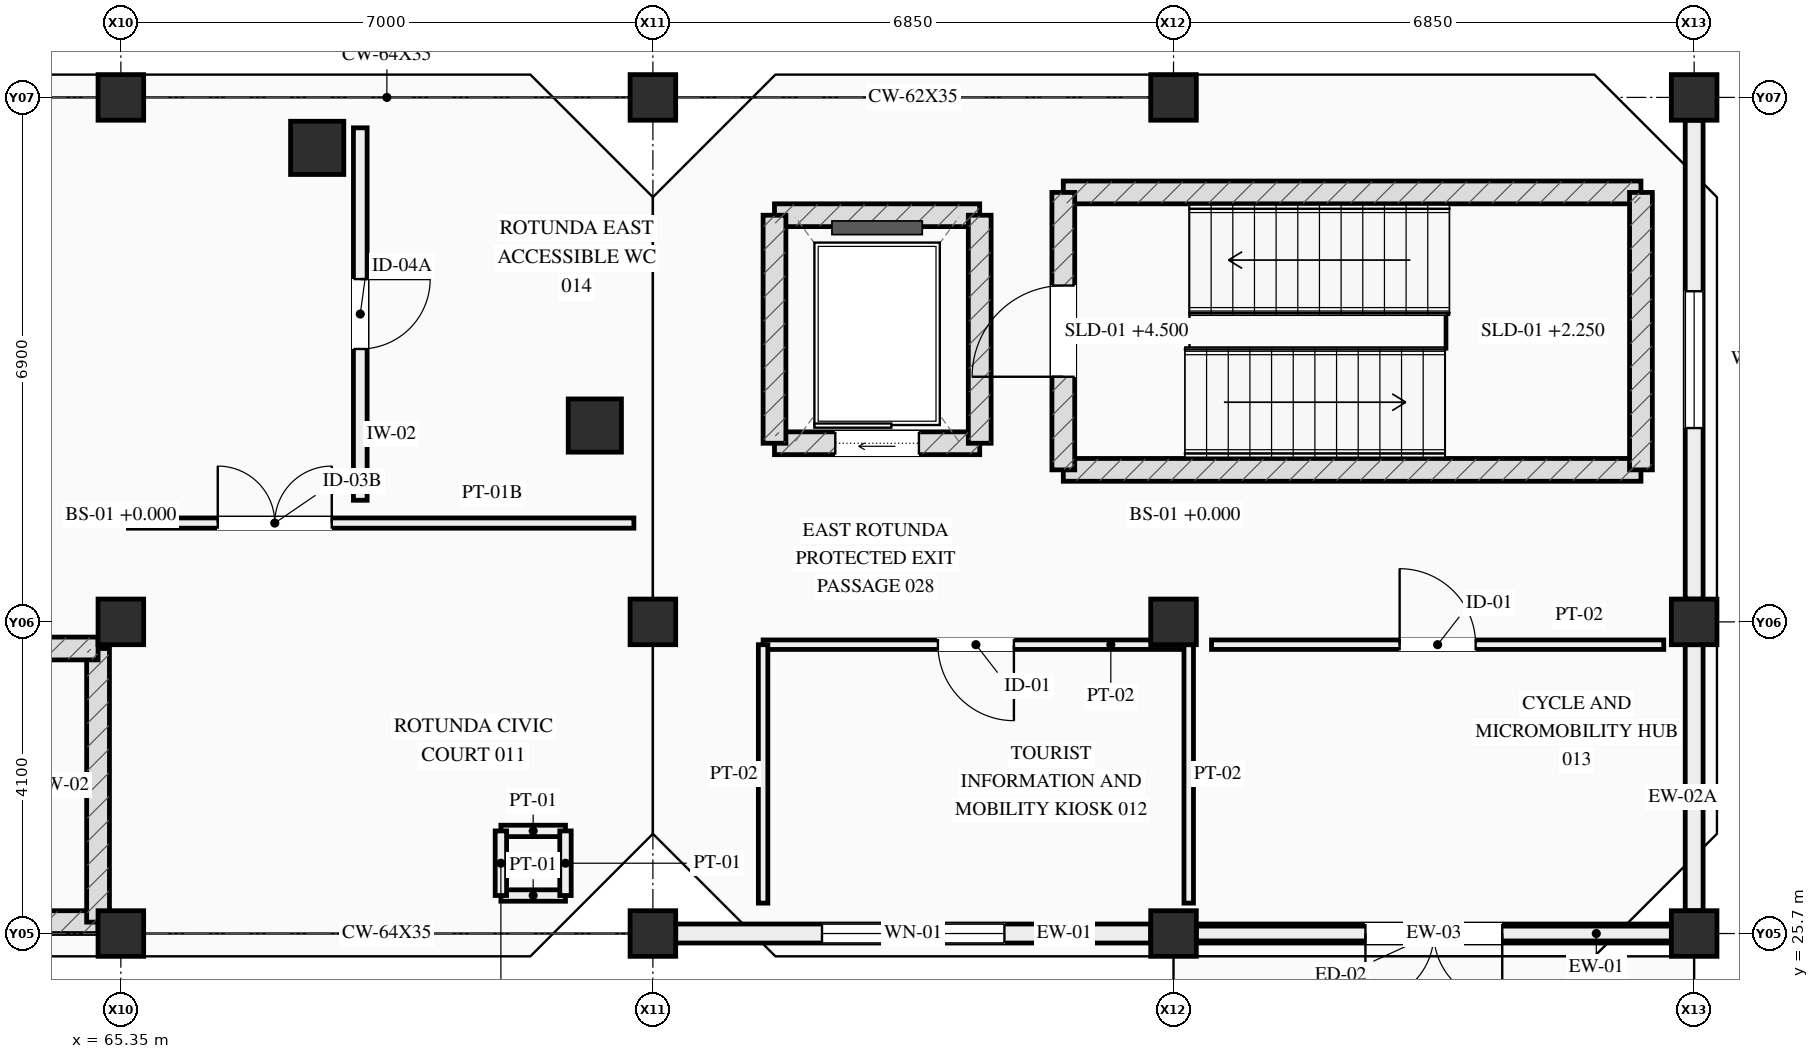
"""IFC4 building model, lengths in metres.
Left out: names, types, materials, properties, quantities, classifications, styles, units other than length and angle.
Written with IfcOpenShell. Run it as: python <this file> out.ifc"""

import sys

from ifc_helpers import new_model, si_unit, direction, frame, frame_2d, origin, origin_2d, place, context, subcontext, project, spatial, rectangle, circle, extrude, element, fill, save


model = new_model("IFC4")
c1 = context("Model", 3, precision=1e-05, world=origin(), true_north=direction((0.0, 1.0)))
c2 = subcontext(c1, "Body", "Model", "MODEL_VIEW")
j1 = project(units=[si_unit("LENGTHUNIT", "METRE"), si_unit("PLANEANGLEUNIT", "RADIAN")], contexts=[c1])
p1 = place(None, origin())
s1 = spatial("IfcSite", under=j1, at=p1, CompositionType="ELEMENT")
p2 = place(p1, origin())
s2 = spatial("IfcBuilding", under=s1, at=p2, CompositionType="ELEMENT")
p3 = place(p2, origin())
s3 = spatial("IfcBuildingStorey", under=s2, at=p3, CompositionType="ELEMENT", Elevation=0.0)
for number, where, z_axis, x_axis in (
    (1, (65.35, 25.7, 0.0), (0.0, 0.0, 1.0), (1.0, 0.0, 0.0)),
    (2, (65.35, 29.8, 0.0), (0.0, 0.0, 1.0), (1.0, 0.0, 0.0)),
    (3, (65.35, 36.7, 0.0), (0.0, 0.0, 1.0), (1.0, 0.0, 0.0)),
    (4, (72.35, 25.7, 0.0), (0.0, 0.0, 1.0), (1.0, 0.0, 0.0)),
    (5, (72.35, 29.8, 0.0), (0.0, 0.0, 1.0), (1.0, 0.0, 0.0)),
    (6, (72.35, 36.7, 0.0), (0.0, 0.0, 1.0), (1.0, 0.0, 0.0)),
    (7, (79.2, 25.7, 0.0), (0.0, 0.0, 1.0), (1.0, 0.0, 0.0)),
    (8, (79.2, 29.8, 0.0), (0.0, 0.0, 1.0), (1.0, 0.0, 0.0)),
    (9, (79.2, 36.7, 0.0), (0.0, 0.0, 1.0), (1.0, 0.0, 0.0)),
    (10, (86.05, 25.7, 0.0), (0.0, 0.0, 1.0), (1.0, 0.0, 0.0)),
    (11, (86.05, 29.8, 0.0), (0.0, 0.0, 1.0), (1.0, 0.0, 0.0)),
    (12, (86.05, 36.7, 0.0), (0.0, 0.0, 1.0), (1.0, 0.0, 0.0)),
):
    element("IfcColumn", number, at=place(p3, frame(where, z_axis=z_axis, x_axis=x_axis)), inside=s3, PredefinedType="COLUMN", context=c2, shape_type="SweptSolid", body=[
        extrude(rectangle(XDim=0.6, YDim=0.6, at=origin_2d()), origin(), (0.0, 0.0, 1.0), 4.5),
    ])
for number, where, z_axis, x_axis in (
    (13, (71.586, 32.383, 0.0), (0.0, 0.0, 1.0), (1.0, 0.0, 0.0)),
    (14, (67.933, 36.036, 0.0), (0.0, 0.0, 1.0), (1.0, 0.0, 0.0)),
):
    element("IfcColumn", number, at=place(p3, frame(where, z_axis=z_axis, x_axis=x_axis)), inside=s3, PredefinedType="COLUMN", context=c2, shape_type="SweptSolid", body=[
        extrude(circle(Radius=0.35, at=origin_2d()), origin(), (0.0, 0.0, 1.0), 4.5),
    ])
p4 = place(p3, frame((85.75, 25.7, 0.0), z_axis=(0.0, 0.0, 1.0), x_axis=(-1.0, 0.0, 0.0)))
e15 = element("IfcWall", 15, at=p4, inside=s3, PredefinedType="STANDARD", context=c2, shape_type="SweptSolid", body=[
    extrude(rectangle(XDim=6.25, YDim=0.25, at=frame_2d((3.125, 0.0))), origin(), (0.0, 0.0, 1.0), 2.985),
])
p5 = place(p4, frame((2.225, 0.0, 0.0)))
e16 = element("IfcOpeningElement", 16, at=p5, cuts=e15, PredefinedType="OPENING", context=c2, shape_type="SweptSolid", body=[
    extrude(rectangle(XDim=1.8, YDim=2.25, at=frame_2d((0.9, 1.125))), frame((0.0, 0.135, 0.0), z_axis=(0.0, -1.0, 0.0), x_axis=(1.0, 0.0, 0.0)), (0.0, 0.0, 1.0), 0.27),
])
p6 = place(p3, frame((85.75, 25.7, 3.35), z_axis=(0.0, 0.0, 1.0), x_axis=(-1.0, 0.0, 0.0)))
e17 = element("IfcWall", 17, at=p6, inside=s3, PredefinedType="STANDARD", context=c2, shape_type="SweptSolid", body=[
    extrude(rectangle(XDim=6.25, YDim=0.195, at=frame_2d((3.125, 0.0))), origin(), (0.0, 0.0, 1.0), 0.23),
])
p7 = place(p3, frame((78.9, 25.7, 0.0), z_axis=(0.0, 0.0, 1.0), x_axis=(-1.0, 0.0, 0.0)))
e18 = element("IfcWall", 18, at=p7, inside=s3, PredefinedType="STANDARD", context=c2, shape_type="SweptSolid", body=[
    extrude(rectangle(XDim=6.25, YDim=0.25, at=frame_2d((3.125, 0.0))), origin(), (0.0, 0.0, 1.0), 3.58),
])
p8 = place(p7, frame((1.925, 0.0, 0.88)))
e19 = element("IfcOpeningElement", 19, at=p8, cuts=e18, PredefinedType="OPENING", context=c2, shape_type="SweptSolid", body=[
    extrude(rectangle(XDim=2.4, YDim=1.45, at=frame_2d((1.2, 0.725))), frame((0.0, 0.135, 0.0), z_axis=(0.0, -1.0, 0.0), x_axis=(1.0, 0.0, 0.0)), (0.0, 0.0, 1.0), 0.27),
])
p9 = place(p3, frame((86.05, 29.5, 0.0), z_axis=(0.0, 0.0, 1.0), x_axis=(0.0, -1.0, 0.0)))
e20 = element("IfcWall", 20, at=p9, inside=s3, PredefinedType="STANDARD", context=c2, shape_type="SweptSolid", body=[
    extrude(rectangle(XDim=3.5, YDim=0.235, at=frame_2d((1.75, 0.0))), origin(), (0.0, 0.0, 1.0), 3.24),
])
p10 = place(p3, frame((86.05, 36.4, 0.0), z_axis=(0.0, 0.0, 1.0), x_axis=(0.0, -1.0, 0.0)))
e21 = element("IfcWall", 21, at=p10, inside=s3, PredefinedType="STANDARD", context=c2, shape_type="SweptSolid", body=[
    extrude(rectangle(XDim=6.3, YDim=0.235, at=frame_2d((3.15, 0.0))), origin(), (0.0, 0.0, 1.0), 3.24),
])
p11 = place(p10, frame((2.25, 0.0, 0.95)))
e22 = element("IfcOpeningElement", 22, at=p11, cuts=e21, PredefinedType="OPENING", context=c2, shape_type="SweptSolid", body=[
    extrude(rectangle(XDim=1.8, YDim=1.4, at=frame_2d((0.9, 0.7))), frame((0.0, 0.127, 0.0), z_axis=(0.0, -1.0, 0.0), x_axis=(1.0, 0.0, 0.0)), (0.0, 0.0, 1.0), 0.255),
])
for number, where, z_axis, x_axis in (
    (23, (70.35, 26.2, 0.0), (0.0, 0.0, 1.0), (1.0, 0.0, 0.0)),
    (24, (70.35, 27.05, 0.0), (0.0, 0.0, 1.0), (1.0, 0.0, 0.0)),
):
    element("IfcWall", number, at=place(p3, frame(where, z_axis=z_axis, x_axis=x_axis)), inside=s3, PredefinedType="PARTITIONING", context=c2, shape_type="SweptSolid", body=[
        extrude(rectangle(XDim=0.85, YDim=0.15, at=frame_2d((0.425, 0.0))), origin(), (0.0, 0.0, 1.0), 3.3),
    ])
for number, where, z_axis, x_axis in (
    (25, (70.35, 26.2, 0.0), (0.0, 0.0, 1.0), (0.0, 1.0, 0.0)),
    (26, (71.2, 26.2, 0.0), (0.0, 0.0, 1.0), (0.0, 1.0, 0.0)),
):
    element("IfcWall", number, at=place(p3, frame(where, z_axis=z_axis, x_axis=x_axis)), inside=s3, PredefinedType="PARTITIONING", context=c2, shape_type="SweptSolid", body=[
        extrude(rectangle(XDim=0.85, YDim=0.15, at=frame_2d((0.425, 0.0))), origin(), (0.0, 0.0, 1.0), 3.3),
    ])
for number, where, z_axis, x_axis in (
    (27, (85.35, 31.8, 0.0), (0.0, 0.0, 1.0), (-1.0, 0.0, 0.0)),
    (28, (77.75, 35.45, 0.0), (0.0, 0.0, 1.0), (1.0, 0.0, 0.0)),
):
    element("IfcWall", number, at=place(p3, frame(where, z_axis=z_axis, x_axis=x_axis)), inside=s3, PredefinedType="SHEAR", context=c2, shape_type="SweptSolid", body=[
        extrude(rectangle(XDim=7.6, YDim=0.3, at=frame_2d((3.8, 0.0))), origin(), (0.0, 0.0, 1.0), 4.26),
    ])
p12 = place(p3, frame((77.75, 31.8, 0.0), z_axis=(0.0, 0.0, 1.0), x_axis=(0.0, 1.0, 0.0)))
e29 = element("IfcWall", 29, at=p12, inside=s3, PredefinedType="SHEAR", context=c2, shape_type="SweptSolid", body=[
    extrude(rectangle(XDim=3.65, YDim=0.3, at=frame_2d((1.825, 0.0))), origin(), (0.0, 0.0, 1.0), 4.26),
])
p13 = place(p12, frame((1.225, 0.0, 0.0)))
e30 = element("IfcOpeningElement", 30, at=p13, cuts=e29, PredefinedType="OPENING", context=c2, shape_type="SweptSolid", body=[
    extrude(rectangle(XDim=1.2, YDim=2.2, at=frame_2d((0.6, 1.1))), frame((0.0, 0.16, 0.0), z_axis=(0.0, -1.0, 0.0), x_axis=(1.0, 0.0, 0.0)), (0.0, 0.0, 1.0), 0.32),
])
p14 = place(p3, frame((85.35, 35.45, 0.0), z_axis=(0.0, 0.0, 1.0), x_axis=(0.0, -1.0, 0.0)))
e31 = element("IfcWall", 31, at=p14, inside=s3, PredefinedType="SHEAR", context=c2, shape_type="SweptSolid", body=[
    extrude(rectangle(XDim=3.65, YDim=0.3, at=frame_2d((1.825, 0.0))), origin(), (0.0, 0.0, 1.0), 4.26),
])
p15 = place(p3, frame((73.95, 32.15, 0.0), z_axis=(0.0, 0.0, 1.0), x_axis=(1.0, 0.0, 0.0)))
e32 = element("IfcWall", 32, at=p15, inside=s3, PredefinedType="SHEAR", context=c2, shape_type="SweptSolid", body=[
    extrude(rectangle(XDim=2.7, YDim=0.3, at=frame_2d((1.35, 0.0))), origin(), (0.0, 0.0, 1.0), 4.26),
])
p16 = place(p15, frame((0.8, 0.0, 0.0)))
e33 = element("IfcOpeningElement", 33, at=p16, cuts=e32, PredefinedType="OPENING", context=c2, shape_type="SweptSolid", body=[
    extrude(rectangle(XDim=1.1, YDim=2.2, at=frame_2d((0.55, 1.1))), frame((0.0, 0.16, 0.0), z_axis=(0.0, -1.0, 0.0), x_axis=(1.0, 0.0, 0.0)), (0.0, 0.0, 1.0), 0.32),
])
p17 = place(p3, frame((73.95, 35.15, 0.0), z_axis=(0.0, 0.0, 1.0), x_axis=(1.0, 0.0, 0.0)))
e34 = element("IfcWall", 34, at=p17, inside=s3, PredefinedType="SHEAR", context=c2, shape_type="SweptSolid", body=[
    extrude(rectangle(XDim=2.7, YDim=0.3, at=frame_2d((1.35, 0.0))), origin(), (0.0, 0.0, 1.0), 4.26),
])
for number, where, z_axis, x_axis in (
    (35, (73.95, 32.15, 0.0), (0.0, 0.0, 1.0), (0.0, 1.0, 0.0)),
    (36, (76.65, 32.15, 0.0), (0.0, 0.0, 1.0), (0.0, 1.0, 0.0)),
):
    element("IfcWall", number, at=place(p3, frame(where, z_axis=z_axis, x_axis=x_axis)), inside=s3, PredefinedType="SHEAR", context=c2, shape_type="SweptSolid", body=[
        extrude(rectangle(XDim=3.0, YDim=0.3, at=frame_2d((1.5, 0.0))), origin(), (0.0, 0.0, 1.0), 4.26),
    ])
p18 = place(p3, frame((58.65, 25.85, 0.0), z_axis=(0.0, 0.0, 1.0), x_axis=(1.0, 0.0, 0.0)))
e37 = element("IfcWall", 37, at=p18, inside=s3, PredefinedType="SHEAR", context=c2, shape_type="SweptSolid", body=[
    extrude(rectangle(XDim=6.4, YDim=0.3, at=frame_2d((3.2, 0.0))), origin(), (0.0, 0.0, 1.0), 4.26),
])
p19 = place(p3, frame((65.05, 25.85, 0.0), z_axis=(0.0, 0.0, 1.0), x_axis=(0.0, 1.0, 0.0)))
e38 = element("IfcWall", 38, at=p19, inside=s3, PredefinedType="SHEAR", context=c2, shape_type="SweptSolid", body=[
    extrude(rectangle(XDim=3.6, YDim=0.3, at=frame_2d((1.8, 0.0))), origin(), (0.0, 0.0, 1.0), 4.26),
])
p20 = place(p3, frame((58.65, 29.45, 0.0), z_axis=(0.0, 0.0, 1.0), x_axis=(1.0, 0.0, 0.0)))
e39 = element("IfcWall", 39, at=p20, inside=s3, PredefinedType="SHEAR", context=c2, shape_type="SweptSolid", body=[
    extrude(rectangle(XDim=6.4, YDim=0.3, at=frame_2d((3.2, 0.0))), origin(), (0.0, 0.0, 1.0), 4.26),
])
p21 = place(p3, frame((65.45, 31.1, 0.0), z_axis=(0.0, 0.0, 1.0), x_axis=(1.0, 0.0, 0.0)))
e40 = element("IfcWall", 40, at=p21, inside=s3, PredefinedType="PARTITIONING", context=c2, shape_type="SweptSolid", body=[
    extrude(rectangle(XDim=6.65, YDim=0.135, at=frame_2d((3.325, 0.0))), origin(), (0.0, 0.0, 1.0), 3.3),
])
p22 = place(p21, frame((1.175, 0.0, 0.0)))
e41 = element("IfcOpeningElement", 41, at=p22, cuts=e40, PredefinedType="OPENING", context=c2, shape_type="SweptSolid", body=[
    extrude(rectangle(XDim=1.5, YDim=2.2, at=frame_2d((0.75, 1.1))), frame((0.0, 0.077, 0.0), z_axis=(0.0, -1.0, 0.0), x_axis=(1.0, 0.0, 0.0)), (0.0, 0.0, 1.0), 0.155),
])
p23 = place(p3, frame((73.8, 29.5, 0.0), z_axis=(0.0, 0.0, 1.0), x_axis=(1.0, 0.0, 0.0)))
e42 = element("IfcWall", 42, at=p23, inside=s3, PredefinedType="PARTITIONING", context=c2, shape_type="SweptSolid", body=[
    extrude(rectangle(XDim=5.6, YDim=0.125, at=frame_2d((2.8, 0.0))), origin(), (0.0, 0.0, 1.0), 3.3),
])
p24 = place(p23, frame((2.3, 0.0, 0.0)))
e43 = element("IfcOpeningElement", 43, at=p24, cuts=e42, PredefinedType="OPENING", context=c2, shape_type="SweptSolid", body=[
    extrude(rectangle(XDim=1.0, YDim=2.15, at=frame_2d((0.5, 1.075))), frame((0.0, 0.073, 0.0), z_axis=(0.0, -1.0, 0.0), x_axis=(1.0, 0.0, 0.0)), (0.0, 0.0, 1.0), 0.145),
])
for number, where, z_axis, x_axis in (
    (44, (73.8, 26.1, 0.0), (0.0, 0.0, 1.0), (0.0, 1.0, 0.0)),
    (45, (79.4, 26.1, 0.0), (0.0, 0.0, 1.0), (0.0, 1.0, 0.0)),
):
    element("IfcWall", number, at=place(p3, frame(where, z_axis=z_axis, x_axis=x_axis)), inside=s3, PredefinedType="PARTITIONING", context=c2, shape_type="SweptSolid", body=[
        extrude(rectangle(XDim=3.4, YDim=0.125, at=frame_2d((1.7, 0.0))), origin(), (0.0, 0.0, 1.0), 3.3),
    ])
p25 = place(p3, frame((79.7, 29.5, 0.0), z_axis=(0.0, 0.0, 1.0), x_axis=(1.0, 0.0, 0.0)))
e46 = element("IfcWall", 46, at=p25, inside=s3, PredefinedType="PARTITIONING", context=c2, shape_type="SweptSolid", body=[
    extrude(rectangle(XDim=5.95, YDim=0.125, at=frame_2d((2.975, 0.0))), origin(), (0.0, 0.0, 1.0), 3.3),
])
p26 = place(p25, frame((2.475, 0.0, 0.0)))
e47 = element("IfcOpeningElement", 47, at=p26, cuts=e46, PredefinedType="OPENING", context=c2, shape_type="SweptSolid", body=[
    extrude(rectangle(XDim=1.0, YDim=2.15, at=frame_2d((0.5, 1.075))), frame((0.0, 0.073, 0.0), z_axis=(0.0, -1.0, 0.0), x_axis=(1.0, 0.0, 0.0)), (0.0, 0.0, 1.0), 0.145),
])
p27 = place(p3, frame((68.5, 31.4, 0.0), z_axis=(0.0, 0.0, 1.0), x_axis=(0.0, 1.0, 0.0)))
e48 = element("IfcWall", 48, at=p27, inside=s3, PredefinedType="PLUMBINGWALL", context=c2, shape_type="SweptSolid", body=[
    extrude(rectangle(XDim=4.9, YDim=0.18, at=frame_2d((2.45, 0.0))), origin(), (0.0, 0.0, 1.0), 3.3),
])
p28 = place(p27, frame((1.99, 0.0, 0.0)))
e49 = element("IfcOpeningElement", 49, at=p28, cuts=e48, PredefinedType="OPENING", context=c2, shape_type="SweptSolid", body=[
    extrude(rectangle(XDim=0.92, YDim=2.1, at=frame_2d((0.46, 1.05))), frame((0.0, 0.1, 0.0), z_axis=(0.0, -1.0, 0.0), x_axis=(1.0, 0.0, 0.0)), (0.0, 0.0, 1.0), 0.2),
])
p29 = place(p5, origin())
e50 = element("IfcDoor", 50, at=p29, inside=s3, OperationType="DOUBLE_DOOR_SINGLE_SWING", PredefinedType="DOOR", context=c2, shape_type="SweptSolid", body=[
    extrude(rectangle(XDim=1.8, YDim=2.25, at=frame_2d((0.9, 1.125))), frame((0.0, 0.025, 0.0), z_axis=(0.0, -1.0, 0.0), x_axis=(1.0, 0.0, 0.0)), (0.0, 0.0, 1.0), 0.05),
])
fill(e16, e50)
p30 = place(p8, origin())
e51 = element("IfcWindow", 51, at=p30, inside=s3, PartitioningType="SINGLE_PANEL", PredefinedType="WINDOW", context=c2, shape_type="SweptSolid", body=[
    extrude(rectangle(XDim=2.4, YDim=1.45, at=frame_2d((1.2, 0.725))), frame((0.0, 0.03, 0.0), z_axis=(0.0, -1.0, 0.0), x_axis=(1.0, 0.0, 0.0)), (0.0, 0.0, 1.0), 0.06),
])
fill(e19, e51)
p31 = place(p11, origin())
e52 = element("IfcWindow", 52, at=p31, inside=s3, PartitioningType="SINGLE_PANEL", PredefinedType="WINDOW", context=c2, shape_type="SweptSolid", body=[
    extrude(rectangle(XDim=1.8, YDim=1.4, at=frame_2d((0.9, 0.7))), frame((0.0, 0.03, 0.0), z_axis=(0.0, -1.0, 0.0), x_axis=(1.0, 0.0, 0.0)), (0.0, 0.0, 1.0), 0.06),
])
fill(e22, e52)
p32 = place(p13, origin())
e53 = element("IfcDoor", 53, at=p32, inside=s3, OperationType="SINGLE_SWING_LEFT", PredefinedType="DOOR", context=c2, shape_type="SweptSolid", body=[
    extrude(rectangle(XDim=1.2, YDim=2.2, at=frame_2d((0.6, 1.1))), frame((0.0, 0.025, 0.0), z_axis=(0.0, -1.0, 0.0), x_axis=(1.0, 0.0, 0.0)), (0.0, 0.0, 1.0), 0.05),
])
fill(e30, e53)
p33 = place(p16, origin())
e54 = element("IfcDoor", 54, at=p33, inside=s3, OperationType="SLIDING_TO_LEFT", PredefinedType="DOOR", context=c2, shape_type="SweptSolid", body=[
    extrude(rectangle(XDim=1.1, YDim=2.2, at=frame_2d((0.55, 1.1))), frame((0.0, 0.025, 0.0), z_axis=(0.0, -1.0, 0.0), x_axis=(1.0, 0.0, 0.0)), (0.0, 0.0, 1.0), 0.05),
])
fill(e33, e54)
p34 = place(p22, origin())
e55 = element("IfcDoor", 55, at=p34, inside=s3, OperationType="DOUBLE_DOOR_SINGLE_SWING", PredefinedType="DOOR", context=c2, shape_type="SweptSolid", body=[
    extrude(rectangle(XDim=1.5, YDim=2.2, at=frame_2d((0.75, 1.1))), frame((0.0, 0.025, 0.0), z_axis=(0.0, -1.0, 0.0), x_axis=(1.0, 0.0, 0.0)), (0.0, 0.0, 1.0), 0.05),
])
fill(e41, e55)
p35 = place(p24, origin())
e56 = element("IfcDoor", 56, at=p35, inside=s3, OperationType="SINGLE_SWING_RIGHT", PredefinedType="DOOR", context=c2, shape_type="SweptSolid", body=[
    extrude(rectangle(XDim=1.0, YDim=2.15, at=frame_2d((0.5, 1.075))), frame((0.0, 0.025, 0.0), z_axis=(0.0, -1.0, 0.0), x_axis=(1.0, 0.0, 0.0)), (0.0, 0.0, 1.0), 0.05),
])
fill(e43, e56)
p36 = place(p26, origin())
e57 = element("IfcDoor", 57, at=p36, inside=s3, OperationType="SINGLE_SWING_LEFT", PredefinedType="DOOR", context=c2, shape_type="SweptSolid", body=[
    extrude(rectangle(XDim=1.0, YDim=2.15, at=frame_2d((0.5, 1.075))), frame((0.0, 0.025, 0.0), z_axis=(0.0, -1.0, 0.0), x_axis=(1.0, 0.0, 0.0)), (0.0, 0.0, 1.0), 0.05),
])
fill(e47, e57)
p37 = place(p28, origin())
e58 = element("IfcDoor", 58, at=p37, inside=s3, OperationType="SINGLE_SWING_RIGHT", PredefinedType="DOOR", context=c2, shape_type="SweptSolid", body=[
    extrude(rectangle(XDim=0.92, YDim=2.1, at=frame_2d((0.46, 1.05))), frame((0.0, 0.025, 0.0), z_axis=(0.0, -1.0, 0.0), x_axis=(1.0, 0.0, 0.0)), (0.0, 0.0, 1.0), 0.05),
])
fill(e49, e58)
save(model, sys.argv[1])
